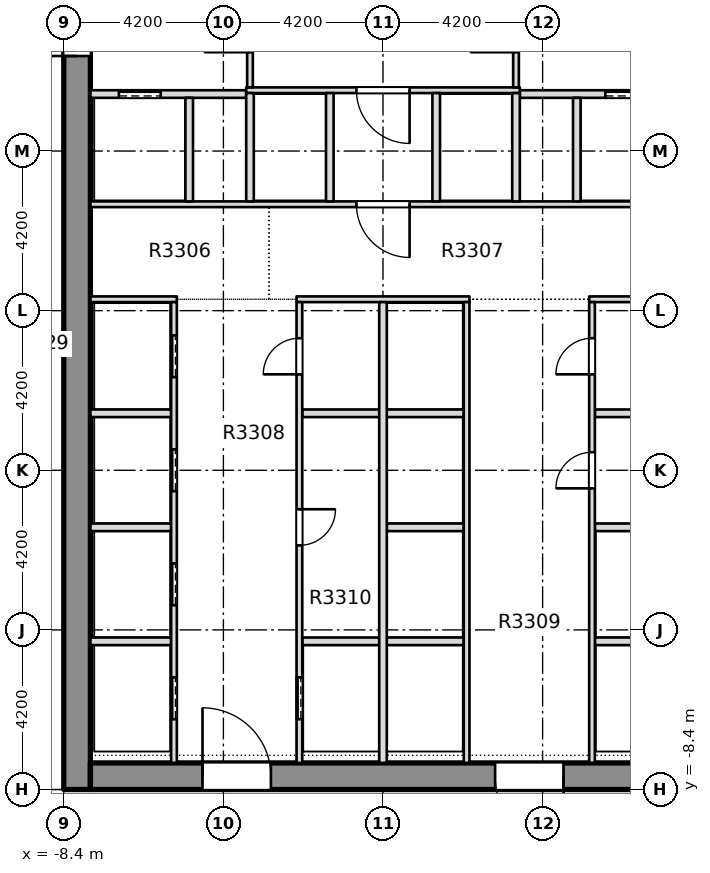
"""IFC4 building model, lengths in metres.
Left out: names, types, materials, properties, quantities, classifications, styles, units other than length and angle.
Written with IfcOpenShell. Run it as: python <this file> out.ifc"""

import sys

from ifc_helpers import new_model, si_unit, direction, frame, frame_2d, origin, place, context, subcontext, project, spatial, rectangle, extrude, element, fill, save


model = new_model("IFC4")
c1 = context("Model", 3, precision=1e-05, world=origin(), true_north=direction((0.0, 1.0)))
c2 = subcontext(c1, "Body", "Model", "MODEL_VIEW")
j1 = project(units=[si_unit("LENGTHUNIT", "METRE"), si_unit("PLANEANGLEUNIT", "RADIAN")], contexts=[c1])
p1 = place(None, origin())
s1 = spatial("IfcSite", under=j1, at=p1, CompositionType="ELEMENT")
p2 = place(p1, origin())
s2 = spatial("IfcBuilding", under=s1, at=p2, CompositionType="ELEMENT")
p3 = place(p2, frame((0.0, 0.0, 133.1)))
s3 = spatial("IfcBuildingStorey", under=s2, at=p3, CompositionType="ELEMENT", Elevation=133.1)
p4 = place(p3, frame((-8.05, -8.4, -0.4), z_axis=(0.0, 0.0, 1.0), x_axis=(0.0, 1.0, 0.0)))
e1 = element("IfcWall", 1, at=p4, inside=s3, PredefinedType="SOLIDWALL", context=c2, shape_type="SweptSolid", body=[
    extrude(rectangle(XDim=30.15, YDim=0.7, at=frame_2d((15.075, 0.0))), origin(), (0.0, 0.0, 1.0), 3.45),
])
p5 = place(p4, frame((19.3, 0.0, 0.4)))
e2 = element("IfcOpeningElement", 2, at=p5, cuts=e1, PredefinedType="OPENING", context=c2, shape_type="SweptSolid", body=[
    extrude(rectangle(XDim=1.2, YDim=2.1, at=frame_2d((0.6, 1.05))), frame((0.0, 0.36, 0.0), z_axis=(0.0, -1.0, 0.0), x_axis=(1.0, 0.0, 0.0)), (0.0, 0.0, 1.0), 0.72),
])
p6 = place(p3, frame((-7.7, -8.05, -0.4), z_axis=(0.0, 0.0, 1.0), x_axis=(1.0, 0.0, 0.0)))
e3 = element("IfcWall", 3, at=p6, inside=s3, PredefinedType="SHEAR", context=c2, shape_type="SweptSolid", body=[
    extrude(rectangle(XDim=15.4, YDim=0.7, at=frame_2d((7.7, 0.0))), origin(), (0.0, 0.0, 1.0), 3.45),
])
p7 = place(p6, frame((2.95, 0.0, 0.4)))
e4 = element("IfcOpeningElement", 4, at=p7, cuts=e3, PredefinedType="OPENING", context=c2, shape_type="SweptSolid", body=[
    extrude(rectangle(XDim=1.8, YDim=2.1, at=frame_2d((0.9, 1.05))), frame((0.0, 0.36, 0.0), z_axis=(0.0, -1.0, 0.0), x_axis=(1.0, 0.0, 0.0)), (0.0, 0.0, 1.0), 0.72),
])
p8 = place(p6, frame((10.65, 0.0, 0.4)))
e5 = element("IfcOpeningElement", 5, at=p8, cuts=e3, PredefinedType="OPENING", context=c2, shape_type="SweptSolid", body=[
    extrude(rectangle(XDim=1.8, YDim=2.1, at=frame_2d((0.9, 1.05))), frame((0.0, 0.36, 0.0), z_axis=(0.0, -1.0, 0.0), x_axis=(1.0, 0.0, 0.0)), (0.0, 0.0, 1.0), 0.72),
])
p9 = place(p3, frame((-7.699, -4.5, 0.0), z_axis=(0.0, 0.0, 1.0), x_axis=(1.0, 0.0, 0.0)))
e6 = element("IfcWall", 6, at=p9, inside=s3, PredefinedType="PARTITIONING", context=c2, shape_type="SweptSolid", body=[
    extrude(rectangle(XDim=2.124, YDim=0.2, at=frame_2d((1.062, 0.0))), origin(), (0.0, 0.0, 1.0), 3.05),
])
p10 = place(p3, frame((-2.125, -4.5, 0.0), z_axis=(0.0, 0.0, 1.0), x_axis=(1.0, 0.0, 0.0)))
e7 = element("IfcWall", 7, at=p10, inside=s3, PredefinedType="PARTITIONING", context=c2, shape_type="SweptSolid", body=[
    extrude(rectangle(XDim=4.25, YDim=0.2, at=frame_2d((2.125, 0.0))), origin(), (0.0, 0.0, 1.0), 3.05),
])
for number, where, z_axis, x_axis in (
    (8, (5.575, -4.5, 0.0), (0.0, 0.0, 1.0), (1.0, 0.0, 0.0)),
    (9, (-7.699, -1.5, 0.0), (0.0, 0.0, 1.0), (1.0, 0.0, 0.0)),
):
    element("IfcWall", number, at=place(p3, frame(where, z_axis=z_axis, x_axis=x_axis)), inside=s3, PredefinedType="PARTITIONING", context=c2, shape_type="SweptSolid", body=[
        extrude(rectangle(XDim=2.124, YDim=0.2, at=frame_2d((1.062, 0.0))), origin(), (0.0, 0.0, 1.0), 3.05),
    ])
p11 = place(p3, frame((0.1, -1.5, 0.0), z_axis=(0.0, 0.0, 1.0), x_axis=(1.0, 0.0, 0.0)))
e10 = element("IfcWall", 10, at=p11, inside=s3, PredefinedType="PARTITIONING", context=c2, shape_type="SweptSolid", body=[
    extrude(rectangle(XDim=2.025, YDim=0.2, at=frame_2d((1.012, 0.0))), origin(), (0.0, 0.0, 1.0), 3.05),
])
for number, where, z_axis, x_axis in (
    (11, (5.575, -1.5, 0.0), (0.0, 0.0, 1.0), (1.0, 0.0, 0.0)),
    (12, (-7.699, 1.5, 0.0), (0.0, 0.0, 1.0), (1.0, 0.0, 0.0)),
):
    element("IfcWall", number, at=place(p3, frame(where, z_axis=z_axis, x_axis=x_axis)), inside=s3, PredefinedType="PARTITIONING", context=c2, shape_type="SweptSolid", body=[
        extrude(rectangle(XDim=2.124, YDim=0.2, at=frame_2d((1.062, 0.0))), origin(), (0.0, 0.0, 1.0), 3.05),
    ])
p12 = place(p3, frame((-2.125, 1.5, 0.0), z_axis=(0.0, 0.0, 1.0), x_axis=(1.0, 0.0, 0.0)))
e13 = element("IfcWall", 13, at=p12, inside=s3, PredefinedType="PARTITIONING", context=c2, shape_type="SweptSolid", body=[
    extrude(rectangle(XDim=4.25, YDim=0.2, at=frame_2d((2.125, 0.0))), origin(), (0.0, 0.0, 1.0), 3.05),
])
p13 = place(p3, frame((5.575, 1.5, 0.0), z_axis=(0.0, 0.0, 1.0), x_axis=(1.0, 0.0, 0.0)))
e14 = element("IfcWall", 14, at=p13, inside=s3, PredefinedType="PARTITIONING", context=c2, shape_type="SweptSolid", body=[
    extrude(rectangle(XDim=2.124, YDim=0.2, at=frame_2d((1.062, 0.0))), origin(), (0.0, 0.0, 1.0), 3.05),
])
p14 = place(p3, frame((-7.699, 4.5, 0.0), z_axis=(0.0, 0.0, 1.0), x_axis=(1.0, 0.0, 0.0)))
e15 = element("IfcWall", 15, at=p14, inside=s3, PredefinedType="PARTITIONING", context=c2, shape_type="SweptSolid", body=[
    extrude(rectangle(XDim=2.274, YDim=0.15, at=frame_2d((1.137, 0.0))), origin(), (0.0, 0.0, 1.0), 3.05),
])
p15 = place(p3, frame((-2.275, 4.5, 0.0), z_axis=(0.0, 0.0, 1.0), x_axis=(1.0, 0.0, 0.0)))
e16 = element("IfcWall", 16, at=p15, inside=s3, PredefinedType="PARTITIONING", context=c2, shape_type="SweptSolid", body=[
    extrude(rectangle(XDim=4.55, YDim=0.15, at=frame_2d((2.275, 0.0))), origin(), (0.0, 0.0, 1.0), 3.05),
])
p16 = place(p3, frame((5.425, 4.5, 0.0), z_axis=(0.0, 0.0, 1.0), x_axis=(1.0, 0.0, 0.0)))
e17 = element("IfcWall", 17, at=p16, inside=s3, PredefinedType="PARTITIONING", context=c2, shape_type="SweptSolid", body=[
    extrude(rectangle(XDim=2.274, YDim=0.15, at=frame_2d((1.137, 0.0))), origin(), (0.0, 0.0, 1.0), 3.05),
])
p17 = place(p3, frame((-7.699, 7.0, 0.0), z_axis=(0.0, 0.0, 1.0), x_axis=(1.0, 0.0, 0.0)))
e18 = element("IfcWall", 18, at=p17, inside=s3, PredefinedType="PARTITIONING", context=c2, shape_type="SweptSolid", body=[
    extrude(rectangle(XDim=15.398, YDim=0.15, at=frame_2d((7.699, 0.0))), origin(), (0.0, 0.0, 1.0), 3.05),
])
p18 = place(p17, frame((6.999, 0.0, 0.0)))
e19 = element("IfcOpeningElement", 19, at=p18, cuts=e18, PredefinedType="OPENING", context=c2, shape_type="SweptSolid", body=[
    extrude(rectangle(XDim=1.4, YDim=2.1, at=frame_2d((0.7, 1.05))), frame((0.0, 0.085, 0.0), z_axis=(0.0, -1.0, 0.0), x_axis=(1.0, 0.0, 0.0)), (0.0, 0.0, 1.0), 0.17),
])
p19 = place(p3, frame((-7.699, 9.9, 0.0), z_axis=(0.0, 0.0, 1.0), x_axis=(1.0, 0.0, 0.0)))
e20 = element("IfcWall", 20, at=p19, inside=s3, PredefinedType="PARTITIONING", context=c2, shape_type="SweptSolid", body=[
    extrude(rectangle(XDim=4.099, YDim=0.2, at=frame_2d((2.049, 0.0))), origin(), (0.0, 0.0, 1.0), 3.05),
])
p20 = place(p19, frame((0.749, 0.0, 0.0)))
e21 = element("IfcOpeningElement", 21, at=p20, cuts=e20, PredefinedType="OPENING", context=c2, shape_type="SweptSolid", body=[
    extrude(rectangle(XDim=1.1, YDim=2.1, at=frame_2d((0.55, 1.05))), frame((0.0, 0.11, 0.0), z_axis=(0.0, -1.0, 0.0), x_axis=(1.0, 0.0, 0.0)), (0.0, 0.0, 1.0), 0.22),
])
p21 = place(p3, frame((3.6, 9.9, 0.0), z_axis=(0.0, 0.0, 1.0), x_axis=(1.0, 0.0, 0.0)))
e22 = element("IfcWall", 22, at=p21, inside=s3, PredefinedType="PARTITIONING", context=c2, shape_type="SweptSolid", body=[
    extrude(rectangle(XDim=4.099, YDim=0.2, at=frame_2d((2.049, 0.0))), origin(), (0.0, 0.0, 1.0), 3.05),
])
p22 = place(p21, frame((2.25, 0.0, 0.0)))
e23 = element("IfcOpeningElement", 23, at=p22, cuts=e22, PredefinedType="OPENING", context=c2, shape_type="SweptSolid", body=[
    extrude(rectangle(XDim=1.1, YDim=2.1, at=frame_2d((0.55, 1.05))), frame((0.0, 0.11, 0.0), z_axis=(0.0, -1.0, 0.0), x_axis=(1.0, 0.0, 0.0)), (0.0, 0.0, 1.0), 0.22),
])
p23 = place(p3, frame((-3.6, 10.0, 0.0), z_axis=(0.0, 0.0, 1.0), x_axis=(1.0, 0.0, 0.0)))
e24 = element("IfcWall", 24, at=p23, inside=s3, PredefinedType="PARTITIONING", context=c2, shape_type="SweptSolid", body=[
    extrude(rectangle(XDim=7.2, YDim=0.15, at=frame_2d((3.6, 0.0))), origin(), (0.0, 0.0, 1.0), 3.05),
])
p24 = place(p23, frame((2.9, 0.0, 0.0)))
e25 = element("IfcOpeningElement", 25, at=p24, cuts=e24, PredefinedType="OPENING", context=c2, shape_type="SweptSolid", body=[
    extrude(rectangle(XDim=1.4, YDim=2.1, at=frame_2d((0.7, 1.05))), frame((0.0, 0.085, 0.0), z_axis=(0.0, -1.0, 0.0), x_axis=(1.0, 0.0, 0.0)), (0.0, 0.0, 1.0), 0.17),
])
p25 = place(p3, frame((-5.5, -7.699, 0.0), z_axis=(0.0, 0.0, 1.0), x_axis=(0.0, 1.0, 0.0)))
e26 = element("IfcWall", 26, at=p25, inside=s3, PredefinedType="PARTITIONING", context=c2, shape_type="SweptSolid", body=[
    extrude(rectangle(XDim=12.124, YDim=0.15, at=frame_2d((6.062, 0.0))), origin(), (0.0, 0.0, 1.0), 3.05),
])
p26 = place(p25, frame((1.149, 0.0, 0.0)))
e27 = element("IfcOpeningElement", 27, at=p26, cuts=e26, PredefinedType="OPENING", context=c2, shape_type="SweptSolid", body=[
    extrude(rectangle(XDim=1.1, YDim=2.1, at=frame_2d((0.55, 1.05))), frame((0.0, 0.085, 0.0), z_axis=(0.0, -1.0, 0.0), x_axis=(1.0, 0.0, 0.0)), (0.0, 0.0, 1.0), 0.17),
])
p27 = place(p25, frame((4.149, 0.0, 0.0)))
e28 = element("IfcOpeningElement", 28, at=p27, cuts=e26, PredefinedType="OPENING", context=c2, shape_type="SweptSolid", body=[
    extrude(rectangle(XDim=1.1, YDim=2.1, at=frame_2d((0.55, 1.05))), frame((0.0, 0.085, 0.0), z_axis=(0.0, -1.0, 0.0), x_axis=(1.0, 0.0, 0.0)), (0.0, 0.0, 1.0), 0.17),
])
p28 = place(p25, frame((7.149, 0.0, 0.0)))
e29 = element("IfcOpeningElement", 29, at=p28, cuts=e26, PredefinedType="OPENING", context=c2, shape_type="SweptSolid", body=[
    extrude(rectangle(XDim=1.1, YDim=2.1, at=frame_2d((0.55, 1.05))), frame((0.0, 0.085, 0.0), z_axis=(0.0, -1.0, 0.0), x_axis=(1.0, 0.0, 0.0)), (0.0, 0.0, 1.0), 0.17),
])
p29 = place(p25, frame((10.149, 0.0, 0.0)))
e30 = element("IfcOpeningElement", 30, at=p29, cuts=e26, PredefinedType="OPENING", context=c2, shape_type="SweptSolid", body=[
    extrude(rectangle(XDim=1.1, YDim=2.1, at=frame_2d((0.55, 1.05))), frame((0.0, 0.085, 0.0), z_axis=(0.0, -1.0, 0.0), x_axis=(1.0, 0.0, 0.0)), (0.0, 0.0, 1.0), 0.17),
])
p30 = place(p3, frame((-5.1, 7.075, 0.0), z_axis=(0.0, 0.0, 1.0), x_axis=(0.0, 1.0, 0.0)))
e31 = element("IfcWall", 31, at=p30, inside=s3, PredefinedType="PARTITIONING", context=c2, shape_type="SweptSolid", body=[
    extrude(rectangle(XDim=2.725, YDim=0.2, at=frame_2d((1.363, 0.0))), origin(), (0.0, 0.0, 1.0), 3.05),
])
p31 = place(p3, frame((-3.5, 7.075, 0.0), z_axis=(0.0, 0.0, 1.0), x_axis=(0.0, 1.0, 0.0)))
e32 = element("IfcWall", 32, at=p31, inside=s3, PredefinedType="PARTITIONING", context=c2, shape_type="SweptSolid", body=[
    extrude(rectangle(XDim=2.85, YDim=0.2, at=frame_2d((1.425, 0.0))), origin(), (0.0, 0.0, 1.0), 3.05),
])
p32 = place(p3, frame((-3.5, 10.075, 0.0), z_axis=(0.0, 0.0, 1.0), x_axis=(0.0, 1.0, 0.0)))
e33 = element("IfcWall", 33, at=p32, inside=s3, PredefinedType="PARTITIONING", context=c2, shape_type="SweptSolid", body=[
    extrude(rectangle(XDim=3.075, YDim=0.15, at=frame_2d((1.538, 0.0))), origin(), (0.0, 0.0, 1.0), 3.05),
])
p33 = place(p32, frame((0.925, 0.0, 0.0)))
e34 = element("IfcOpeningElement", 34, at=p33, cuts=e33, PredefinedType="OPENING", context=c2, shape_type="SweptSolid", body=[
    extrude(rectangle(XDim=1.2, YDim=2.1, at=frame_2d((0.6, 1.05))), frame((0.0, 0.085, 0.0), z_axis=(0.0, -1.0, 0.0), x_axis=(1.0, 0.0, 0.0)), (0.0, 0.0, 1.0), 0.17),
])
p34 = place(p3, frame((-2.2, -7.699, 0.0), z_axis=(0.0, 0.0, 1.0), x_axis=(0.0, 1.0, 0.0)))
e35 = element("IfcWall", 35, at=p34, inside=s3, PredefinedType="PARTITIONING", context=c2, shape_type="SweptSolid", body=[
    extrude(rectangle(XDim=12.124, YDim=0.15, at=frame_2d((6.062, 0.0))), origin(), (0.0, 0.0, 1.0), 3.05),
])
p35 = place(p34, frame((1.149, 0.0, 0.0)))
e36 = element("IfcOpeningElement", 36, at=p35, cuts=e35, PredefinedType="OPENING", context=c2, shape_type="SweptSolid", body=[
    extrude(rectangle(XDim=1.1, YDim=2.1, at=frame_2d((0.55, 1.05))), frame((0.0, 0.085, 0.0), z_axis=(0.0, -1.0, 0.0), x_axis=(1.0, 0.0, 0.0)), (0.0, 0.0, 1.0), 0.17),
])
p36 = place(p34, frame((5.724, 0.0, 0.0)))
e37 = element("IfcOpeningElement", 37, at=p36, cuts=e35, PredefinedType="OPENING", context=c2, shape_type="SweptSolid", body=[
    extrude(rectangle(XDim=0.95, YDim=2.1, at=frame_2d((0.475, 1.05))), frame((0.0, 0.085, 0.0), z_axis=(0.0, -1.0, 0.0), x_axis=(1.0, 0.0, 0.0)), (0.0, 0.0, 1.0), 0.17),
])
p37 = place(p34, frame((10.224, 0.0, 0.0)))
e38 = element("IfcOpeningElement", 38, at=p37, cuts=e35, PredefinedType="OPENING", context=c2, shape_type="SweptSolid", body=[
    extrude(rectangle(XDim=0.95, YDim=2.1, at=frame_2d((0.475, 1.05))), frame((0.0, 0.085, 0.0), z_axis=(0.0, -1.0, 0.0), x_axis=(1.0, 0.0, 0.0)), (0.0, 0.0, 1.0), 0.17),
])
p38 = place(p3, frame((-1.4, 7.075, 0.0), z_axis=(0.0, 0.0, 1.0), x_axis=(0.0, 1.0, 0.0)))
e39 = element("IfcWall", 39, at=p38, inside=s3, PredefinedType="PARTITIONING", context=c2, shape_type="SweptSolid", body=[
    extrude(rectangle(XDim=2.85, YDim=0.2, at=frame_2d((1.425, 0.0))), origin(), (0.0, 0.0, 1.0), 3.05),
])
p39 = place(p3, frame((0.0, -7.699, 0.0), z_axis=(0.0, 0.0, 1.0), x_axis=(0.0, 1.0, 0.0)))
e40 = element("IfcWall", 40, at=p39, inside=s3, PredefinedType="PARTITIONING", context=c2, shape_type="SweptSolid", body=[
    extrude(rectangle(XDim=12.124, YDim=0.2, at=frame_2d((6.062, 0.0))), origin(), (0.0, 0.0, 1.0), 3.05),
])
p40 = place(p3, frame((1.4, 7.075, 0.0), z_axis=(0.0, 0.0, 1.0), x_axis=(0.0, 1.0, 0.0)))
e41 = element("IfcWall", 41, at=p40, inside=s3, PredefinedType="PARTITIONING", context=c2, shape_type="SweptSolid", body=[
    extrude(rectangle(XDim=2.85, YDim=0.2, at=frame_2d((1.425, 0.0))), origin(), (0.0, 0.0, 1.0), 3.05),
])
p41 = place(p3, frame((2.2, -7.699, 0.0), z_axis=(0.0, 0.0, 1.0), x_axis=(0.0, 1.0, 0.0)))
e42 = element("IfcWall", 42, at=p41, inside=s3, PredefinedType="PARTITIONING", context=c2, shape_type="SweptSolid", body=[
    extrude(rectangle(XDim=12.124, YDim=0.15, at=frame_2d((6.062, 0.0))), origin(), (0.0, 0.0, 1.0), 3.05),
])
p42 = place(p3, frame((3.5, 7.075, 0.0), z_axis=(0.0, 0.0, 1.0), x_axis=(0.0, 1.0, 0.0)))
e43 = element("IfcWall", 43, at=p42, inside=s3, PredefinedType="PARTITIONING", context=c2, shape_type="SweptSolid", body=[
    extrude(rectangle(XDim=2.85, YDim=0.2, at=frame_2d((1.425, 0.0))), origin(), (0.0, 0.0, 1.0), 3.05),
])
p43 = place(p3, frame((3.5, 10.075, 0.0), z_axis=(0.0, 0.0, 1.0), x_axis=(0.0, 1.0, 0.0)))
e44 = element("IfcWall", 44, at=p43, inside=s3, PredefinedType="PARTITIONING", context=c2, shape_type="SweptSolid", body=[
    extrude(rectangle(XDim=3.075, YDim=0.15, at=frame_2d((1.538, 0.0))), origin(), (0.0, 0.0, 1.0), 3.05),
])
p44 = place(p43, frame((0.925, 0.0, 0.0)))
e45 = element("IfcOpeningElement", 45, at=p44, cuts=e44, PredefinedType="OPENING", context=c2, shape_type="SweptSolid", body=[
    extrude(rectangle(XDim=1.2, YDim=2.1, at=frame_2d((0.6, 1.05))), frame((0.0, 0.085, 0.0), z_axis=(0.0, -1.0, 0.0), x_axis=(1.0, 0.0, 0.0)), (0.0, 0.0, 1.0), 0.17),
])
p45 = place(p3, frame((5.1, 7.075, 0.0), z_axis=(0.0, 0.0, 1.0), x_axis=(0.0, 1.0, 0.0)))
e46 = element("IfcWall", 46, at=p45, inside=s3, PredefinedType="PARTITIONING", context=c2, shape_type="SweptSolid", body=[
    extrude(rectangle(XDim=2.725, YDim=0.2, at=frame_2d((1.363, 0.0))), origin(), (0.0, 0.0, 1.0), 3.05),
])
p46 = place(p3, frame((5.5, -7.699, 0.0), z_axis=(0.0, 0.0, 1.0), x_axis=(0.0, 1.0, 0.0)))
e47 = element("IfcWall", 47, at=p46, inside=s3, PredefinedType="PARTITIONING", context=c2, shape_type="SweptSolid", body=[
    extrude(rectangle(XDim=12.124, YDim=0.15, at=frame_2d((6.062, 0.0))), origin(), (0.0, 0.0, 1.0), 3.05),
])
p47 = place(p46, frame((7.224, 0.0, 0.0)))
e48 = element("IfcOpeningElement", 48, at=p47, cuts=e47, PredefinedType="OPENING", context=c2, shape_type="SweptSolid", body=[
    extrude(rectangle(XDim=0.95, YDim=2.1, at=frame_2d((0.475, 1.05))), frame((0.0, 0.085, 0.0), z_axis=(0.0, -1.0, 0.0), x_axis=(1.0, 0.0, 0.0)), (0.0, 0.0, 1.0), 0.17),
])
p48 = place(p46, frame((10.224, 0.0, 0.0)))
e49 = element("IfcOpeningElement", 49, at=p48, cuts=e47, PredefinedType="OPENING", context=c2, shape_type="SweptSolid", body=[
    extrude(rectangle(XDim=0.95, YDim=2.1, at=frame_2d((0.475, 1.05))), frame((0.0, 0.085, 0.0), z_axis=(0.0, -1.0, 0.0), x_axis=(1.0, 0.0, 0.0)), (0.0, 0.0, 1.0), 0.17),
])
p49 = place(p26, origin())
e50 = element("IfcDoor", 50, at=p49, inside=s3, OperationType="SLIDING_TO_LEFT", PredefinedType="DOOR", context=c2, shape_type="SweptSolid", body=[
    extrude(rectangle(XDim=1.1, YDim=2.1, at=frame_2d((0.55, 1.05))), frame((0.0, 0.025, 0.0), z_axis=(0.0, -1.0, 0.0), x_axis=(1.0, 0.0, 0.0)), (0.0, 0.0, 1.0), 0.05),
])
fill(e27, e50)
p50 = place(p27, origin())
e51 = element("IfcDoor", 51, at=p50, inside=s3, OperationType="SLIDING_TO_LEFT", PredefinedType="DOOR", context=c2, shape_type="SweptSolid", body=[
    extrude(rectangle(XDim=1.1, YDim=2.1, at=frame_2d((0.55, 1.05))), frame((0.0, 0.025, 0.0), z_axis=(0.0, -1.0, 0.0), x_axis=(1.0, 0.0, 0.0)), (0.0, 0.0, 1.0), 0.05),
])
fill(e28, e51)
p51 = place(p28, origin())
e52 = element("IfcDoor", 52, at=p51, inside=s3, OperationType="SLIDING_TO_LEFT", PredefinedType="DOOR", context=c2, shape_type="SweptSolid", body=[
    extrude(rectangle(XDim=1.1, YDim=2.1, at=frame_2d((0.55, 1.05))), frame((0.0, 0.025, 0.0), z_axis=(0.0, -1.0, 0.0), x_axis=(1.0, 0.0, 0.0)), (0.0, 0.0, 1.0), 0.05),
])
fill(e29, e52)
p52 = place(p29, origin())
e53 = element("IfcDoor", 53, at=p52, inside=s3, OperationType="SLIDING_TO_LEFT", PredefinedType="DOOR", context=c2, shape_type="SweptSolid", body=[
    extrude(rectangle(XDim=1.1, YDim=2.1, at=frame_2d((0.55, 1.05))), frame((0.0, 0.025, 0.0), z_axis=(0.0, -1.0, 0.0), x_axis=(1.0, 0.0, 0.0)), (0.0, 0.0, 1.0), 0.05),
])
fill(e30, e53)
p53 = place(p35, origin())
e54 = element("IfcDoor", 54, at=p53, inside=s3, OperationType="SLIDING_TO_LEFT", PredefinedType="DOOR", context=c2, shape_type="SweptSolid", body=[
    extrude(rectangle(XDim=1.1, YDim=2.1, at=frame_2d((0.55, 1.05))), frame((0.0, 0.025, 0.0), z_axis=(0.0, -1.0, 0.0), x_axis=(1.0, 0.0, 0.0)), (0.0, 0.0, 1.0), 0.05),
])
fill(e36, e54)
p54 = place(p36, origin())
e55 = element("IfcDoor", 55, at=p54, inside=s3, OperationType="SINGLE_SWING_LEFT", PredefinedType="DOOR", context=c2, shape_type="SweptSolid", body=[
    extrude(rectangle(XDim=0.95, YDim=2.1, at=frame_2d((0.475, 1.05))), frame((0.0, 0.025, 0.0), z_axis=(0.0, -1.0, 0.0), x_axis=(1.0, 0.0, 0.0)), (0.0, 0.0, 1.0), 0.05),
])
fill(e37, e55)
p55 = place(p37, origin())
e56 = element("IfcDoor", 56, at=p55, inside=s3, OperationType="SINGLE_SWING_RIGHT", PredefinedType="DOOR", context=c2, shape_type="SweptSolid", body=[
    extrude(rectangle(XDim=0.95, YDim=2.1, at=frame_2d((0.475, 1.05))), frame((0.0, 0.025, 0.0), z_axis=(0.0, -1.0, 0.0), x_axis=(1.0, 0.0, 0.0)), (0.0, 0.0, 1.0), 0.05),
])
fill(e38, e56)
p56 = place(p47, origin())
e57 = element("IfcDoor", 57, at=p56, inside=s3, OperationType="SINGLE_SWING_RIGHT", PredefinedType="DOOR", context=c2, shape_type="SweptSolid", body=[
    extrude(rectangle(XDim=0.95, YDim=2.1, at=frame_2d((0.475, 1.05))), frame((0.0, 0.025, 0.0), z_axis=(0.0, -1.0, 0.0), x_axis=(1.0, 0.0, 0.0)), (0.0, 0.0, 1.0), 0.05),
])
fill(e48, e57)
p57 = place(p48, origin())
e58 = element("IfcDoor", 58, at=p57, inside=s3, OperationType="SINGLE_SWING_RIGHT", PredefinedType="DOOR", context=c2, shape_type="SweptSolid", body=[
    extrude(rectangle(XDim=0.95, YDim=2.1, at=frame_2d((0.475, 1.05))), frame((0.0, 0.025, 0.0), z_axis=(0.0, -1.0, 0.0), x_axis=(1.0, 0.0, 0.0)), (0.0, 0.0, 1.0), 0.05),
])
fill(e49, e58)
p58 = place(p20, origin())
e59 = element("IfcDoor", 59, at=p58, inside=s3, OperationType="SLIDING_TO_RIGHT", PredefinedType="DOOR", context=c2, shape_type="SweptSolid", body=[
    extrude(rectangle(XDim=1.1, YDim=2.1, at=frame_2d((0.55, 1.05))), frame((0.0, 0.025, 0.0), z_axis=(0.0, -1.0, 0.0), x_axis=(1.0, 0.0, 0.0)), (0.0, 0.0, 1.0), 0.05),
])
fill(e21, e59)
p59 = place(p22, origin())
e60 = element("IfcDoor", 60, at=p59, inside=s3, OperationType="SLIDING_TO_LEFT", PredefinedType="DOOR", context=c2, shape_type="SweptSolid", body=[
    extrude(rectangle(XDim=1.1, YDim=2.1, at=frame_2d((0.55, 1.05))), frame((0.0, 0.025, 0.0), z_axis=(0.0, -1.0, 0.0), x_axis=(1.0, 0.0, 0.0)), (0.0, 0.0, 1.0), 0.05),
])
fill(e23, e60)
p60 = place(p18, origin())
e61 = element("IfcDoor", 61, at=p60, inside=s3, OperationType="SINGLE_SWING_RIGHT", PredefinedType="DOOR", context=c2, shape_type="SweptSolid", body=[
    extrude(rectangle(XDim=1.4, YDim=2.1, at=frame_2d((0.7, 1.05))), frame((0.0, 0.025, 0.0), z_axis=(0.0, -1.0, 0.0), x_axis=(1.0, 0.0, 0.0)), (0.0, 0.0, 1.0), 0.05),
])
fill(e19, e61)
p61 = place(p24, origin())
e62 = element("IfcDoor", 62, at=p61, inside=s3, OperationType="SINGLE_SWING_RIGHT", PredefinedType="DOOR", context=c2, shape_type="SweptSolid", body=[
    extrude(rectangle(XDim=1.4, YDim=2.1, at=frame_2d((0.7, 1.05))), frame((0.0, 0.025, 0.0), z_axis=(0.0, -1.0, 0.0), x_axis=(1.0, 0.0, 0.0)), (0.0, 0.0, 1.0), 0.05),
])
fill(e25, e62)
p62 = place(p7, origin())
e63 = element("IfcDoor", 63, at=p62, inside=s3, OperationType="SINGLE_SWING_LEFT", PredefinedType="DOOR", context=c2, shape_type="SweptSolid", body=[
    extrude(rectangle(XDim=1.8, YDim=2.1, at=frame_2d((0.9, 1.05))), frame((0.0, 0.025, 0.0), z_axis=(0.0, -1.0, 0.0), x_axis=(1.0, 0.0, 0.0)), (0.0, 0.0, 1.0), 0.05),
])
fill(e4, e63)
p63 = place(p8, origin())
e64 = element("IfcDoor", 64, at=p63, inside=s3, OperationType="SINGLE_SWING_LEFT", PredefinedType="DOOR", context=c2, shape_type="SweptSolid", body=[
    extrude(rectangle(XDim=1.8, YDim=2.1, at=frame_2d((0.9, 1.05))), frame((0.0, 0.025, 0.0), z_axis=(0.0, -1.0, 0.0), x_axis=(1.0, 0.0, 0.0)), (0.0, 0.0, 1.0), 0.05),
])
fill(e5, e64)
p64 = place(p5, origin())
e65 = element("IfcDoor", 65, at=p64, inside=s3, OperationType="SINGLE_SWING_LEFT", PredefinedType="DOOR", context=c2, shape_type="SweptSolid", body=[
    extrude(rectangle(XDim=1.2, YDim=2.1, at=frame_2d((0.6, 1.05))), frame((0.0, 0.025, 0.0), z_axis=(0.0, -1.0, 0.0), x_axis=(1.0, 0.0, 0.0)), (0.0, 0.0, 1.0), 0.05),
])
fill(e2, e65)
save(model, sys.argv[1])
